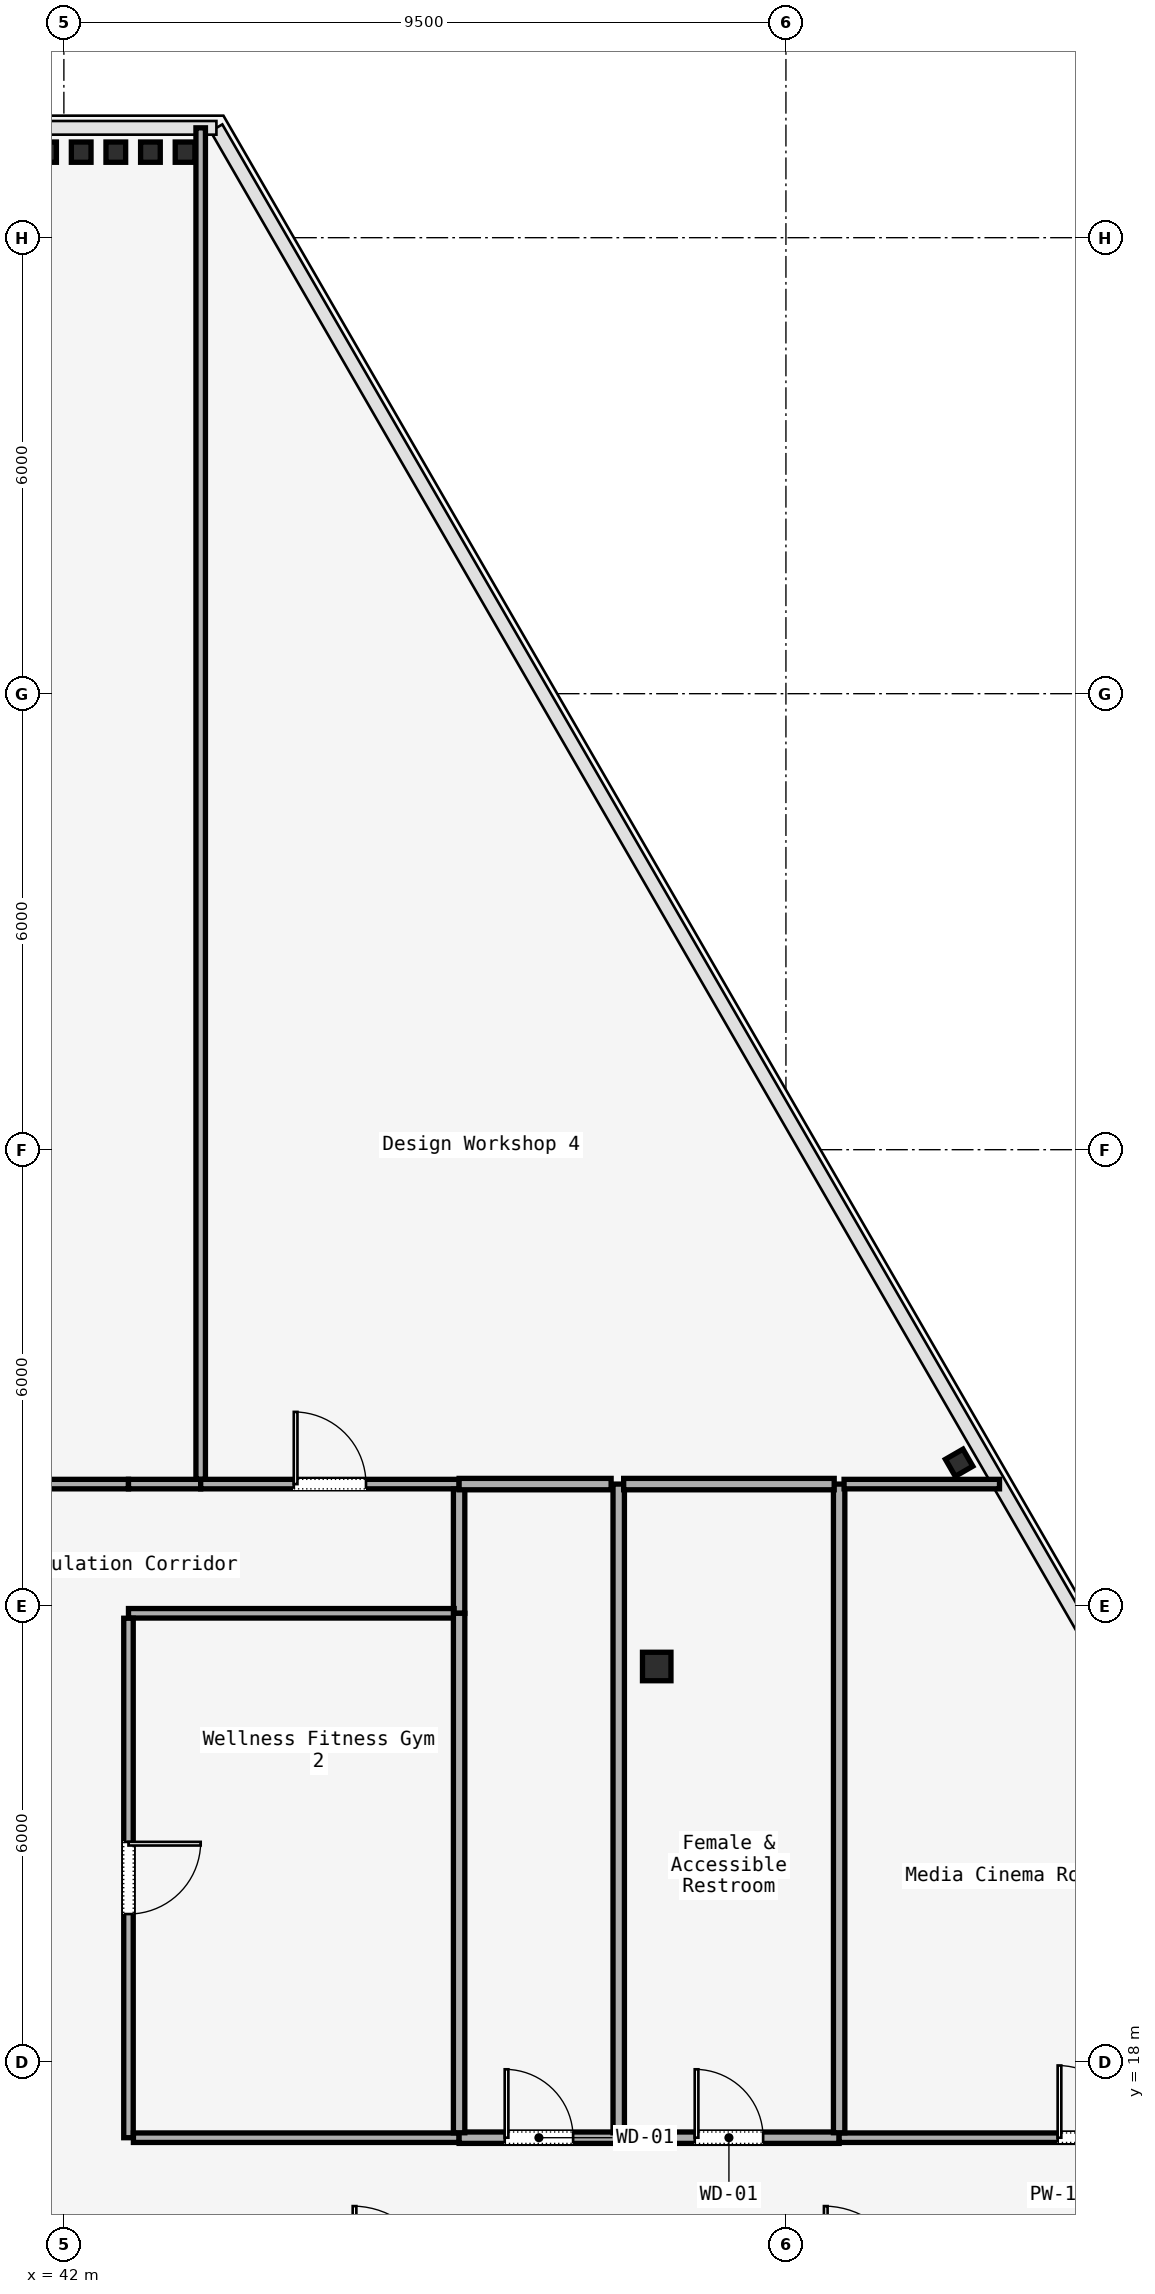
"""IFC4 building model, lengths in metres.
Left out: names, types, materials, properties, quantities, classifications, styles, units other than length and angle.
Written with IfcOpenShell. Run it as: python <this file> out.ifc"""

import sys

from ifc_helpers import new_model, si_unit, direction, frame, frame_2d, origin, origin_2d, place, context, subcontext, project, spatial, rectangle, i_section, extrude, element, fill, save


model = new_model("IFC4")
c1 = context("Model", 3, precision=1e-05, world=origin(), true_north=direction((0.0, 1.0)))
c2 = subcontext(c1, "Body", "Model", "MODEL_VIEW")
j1 = project(units=[si_unit("LENGTHUNIT", "METRE"), si_unit("PLANEANGLEUNIT", "RADIAN")], contexts=[c1])
p1 = place(None, origin())
s1 = spatial("IfcSite", under=j1, at=p1, CompositionType="ELEMENT")
p2 = place(p1, origin())
s2 = spatial("IfcBuilding", under=s1, at=p2, CompositionType="ELEMENT")
p3 = place(p2, frame((0.0, 0.0, 294.7)))
s3 = spatial("IfcBuildingStorey", under=s2, at=p3, CompositionType="ELEMENT", Elevation=294.7)
p4 = place(p3, frame((49.8, 23.2, 0.0), z_axis=(0.0, 0.0, 1.0), x_axis=(1.0, 0.0, 0.0)))
e1 = element("IfcColumn", 1, at=p4, inside=s3, PredefinedType="COLUMN", context=c2, shape_type="SweptSolid", body=[
    extrude(i_section(OverallWidth=0.375, OverallDepth=0.375, WebThickness=0.017, FlangeThickness=0.027, FilletRadius=0.015, at=origin_2d()), origin(), (0.0, 0.0, 1.0), 3.52),
])
p5 = place(p3, frame((53.778, 25.881, 0.0), z_axis=(-0.022172660725, -0.03838641888, 0.999016944782), x_axis=(-0.000225551712, 0.999262773798, 0.038390858658)))
e2 = element("IfcColumn", 2, at=p5, inside=s3, PredefinedType="COLUMN", context=c2, shape_type="SweptSolid", body=[
    extrude(i_section(OverallWidth=0.259, OverallDepth=0.267, WebThickness=0.013, FlangeThickness=0.021, FilletRadius=0.013, at=origin_2d()), origin(), (0.0, 0.0, 1.0), 3.523),
])
p6 = place(p3, frame((43.594, 43.125, 0.0), z_axis=(-0.021552704065, -0.034096239229, 0.999186132519), x_axis=(0.845284715511, -0.534316151471, 0.0)))
e3 = element("IfcColumn", 3, at=p6, inside=s3, PredefinedType="COLUMN", context=c2, shape_type="SweptSolid", body=[
    extrude(i_section(OverallWidth=0.259, OverallDepth=0.267, WebThickness=0.013, FlangeThickness=0.021, FilletRadius=0.013, at=origin_2d()), origin(), (0.0, 0.0, 1.0), 3.523),
])
p7 = place(p3, frame((43.139, 43.125, 0.0), z_axis=(-0.015455933932, -0.03410008742, 0.999298903304), x_axis=(0.910809744164, -0.412826367782, 0.0)))
e4 = element("IfcColumn", 4, at=p7, inside=s3, PredefinedType="COLUMN", context=c2, shape_type="SweptSolid", body=[
    extrude(i_section(OverallWidth=0.259, OverallDepth=0.267, WebThickness=0.013, FlangeThickness=0.021, FilletRadius=0.013, at=origin_2d()), origin(), (0.0, 0.0, 1.0), 3.522),
])
p8 = place(p3, frame((42.683, 43.125, 0.0), z_axis=(-0.009288131033, -0.034102690061, 0.999375173372), x_axis=(0.964854275814, -0.262785514144, 0.0)))
e5 = element("IfcColumn", 5, at=p8, inside=s3, PredefinedType="COLUMN", context=c2, shape_type="SweptSolid", body=[
    extrude(i_section(OverallWidth=0.259, OverallDepth=0.267, WebThickness=0.013, FlangeThickness=0.021, FilletRadius=0.013, at=origin_2d()), origin(), (0.0, 0.0, 1.0), 3.522),
])
for number, where, z_axis, x_axis in (
    (6, (42.228, 43.125, 0.0), (-0.003, -0.034, 0.999), (0.996, -0.091, 0.0)),
    (7, (41.772, 43.125, 0.0), (0.003, -0.034, 0.999), (0.996, 0.091, 0.0)),
):
    element("IfcColumn", number, at=place(p3, frame(where, z_axis=z_axis, x_axis=x_axis)), inside=s3, PredefinedType="COLUMN", context=c2, shape_type="SweptSolid", body=[
        extrude(i_section(OverallWidth=0.259, OverallDepth=0.267, WebThickness=0.013, FlangeThickness=0.021, FilletRadius=0.013, at=origin_2d()), origin(), (0.0, 0.0, 1.0), 3.522),
    ])
p9 = place(p3, frame((41.15, 25.6, 0.0), z_axis=(0.0, 0.0, 1.0), x_axis=(1.0, 0.0, 0.0)))
e8 = element("IfcWall", 8, at=p9, inside=s3, PredefinedType="PARTITIONING", context=c2, shape_type="SweptSolid", body=[
    extrude(rectangle(XDim=1.7, YDim=0.125, at=frame_2d((0.85, 0.0))), origin(), (0.0, 0.0, 1.0), 2.95),
])
p10 = place(p3, frame((42.85, 25.6, 0.0), z_axis=(0.0, 0.0, 1.0), x_axis=(1.0, 0.0, 0.0)))
e9 = element("IfcWall", 9, at=p10, inside=s3, PredefinedType="PARTITIONING", context=c2, shape_type="SweptSolid", body=[
    extrude(rectangle(XDim=0.95, YDim=0.125, at=frame_2d((0.475, 0.0))), origin(), (0.0, 0.0, 1.0), 2.95),
])
p11 = place(p3, frame((43.8, 25.6, 0.0), z_axis=(0.0, 0.0, 1.0), x_axis=(1.0, 0.0, 0.0)))
e10 = element("IfcWall", 10, at=p11, inside=s3, PredefinedType="PARTITIONING", context=c2, shape_type="SweptSolid", body=[
    extrude(rectangle(XDim=3.4, YDim=0.125, at=frame_2d((1.7, 0.0))), origin(), (0.0, 0.0, 1.0), 2.95),
])
p12 = place(p11, frame((1.225, 0.0, 0.0)))
e11 = element("IfcOpeningElement", 11, at=p12, cuts=e10, PredefinedType="OPENING", context=c2, shape_type="SweptSolid", body=[
    extrude(rectangle(XDim=0.95, YDim=2.2, at=frame_2d((0.475, 1.1))), frame((0.0, 0.062, 0.0), z_axis=(0.0, -1.0, 0.0), x_axis=(1.0, 0.0, 0.0)), (0.0, 0.0, 1.0), 0.125),
])
p13 = place(p3, frame((47.2, 25.535, 0.0), z_axis=(0.0, 0.0, 1.0), x_axis=(0.0, -1.0, 0.0)))
e12 = element("IfcWall", 12, at=p13, inside=s3, PredefinedType="PARTITIONING", context=c2, shape_type="SweptSolid", body=[
    extrude(rectangle(XDim=1.635, YDim=0.15, at=frame_2d((0.817, 0.0))), origin(), (0.0, 0.0, 1.0), 2.95),
])
p14 = place(p3, frame((47.135, 23.9, 0.0), z_axis=(0.0, 0.0, 1.0), x_axis=(-1.0, 0.0, 0.0)))
e13 = element("IfcWall", 13, at=p14, inside=s3, PredefinedType="PARTITIONING", context=c2, shape_type="SweptSolid", body=[
    extrude(rectangle(XDim=4.285, YDim=0.125, at=frame_2d((2.143, 0.0))), origin(), (0.0, 0.0, 1.0), 2.95),
])
p15 = place(p3, frame((42.85, 23.835, 0.0), z_axis=(0.0, 0.0, 1.0), x_axis=(0.0, -1.0, 0.0)))
e14 = element("IfcWall", 14, at=p15, inside=s3, PredefinedType="PARTITIONING", context=c2, shape_type="SweptSolid", body=[
    extrude(rectangle(XDim=6.835, YDim=0.125, at=frame_2d((3.417, 0.0))), origin(), (0.0, 0.0, 1.0), 2.95),
])
p16 = place(p15, frame((2.942, 0.0, 0.0)))
e15 = element("IfcOpeningElement", 15, at=p16, cuts=e14, PredefinedType="OPENING", context=c2, shape_type="SweptSolid", body=[
    extrude(rectangle(XDim=0.95, YDim=2.2, at=frame_2d((0.475, 1.1))), frame((0.0, 0.062, 0.0), z_axis=(0.0, -1.0, 0.0), x_axis=(1.0, 0.0, 0.0)), (0.0, 0.0, 1.0), 0.125),
])
p17 = place(p3, frame((42.915, 17.0, 0.0), z_axis=(0.0, 0.0, 1.0), x_axis=(1.0, 0.0, 0.0)))
e16 = element("IfcWall", 16, at=p17, inside=s3, PredefinedType="PARTITIONING", context=c2, shape_type="SweptSolid", body=[
    extrude(rectangle(XDim=4.285, YDim=0.125, at=frame_2d((2.143, 0.0))), origin(), (0.0, 0.0, 1.0), 2.95),
])
p18 = place(p3, frame((47.2, 17.0, 0.0), z_axis=(0.0, 0.0, 1.0), x_axis=(1.0, 0.0, 0.0)))
e17 = element("IfcWall", 17, at=p18, inside=s3, PredefinedType="PARTITIONING", context=c2, shape_type="SweptSolid", body=[
    extrude(rectangle(XDim=2.1, YDim=0.15, at=frame_2d((1.05, 0.0))), origin(), (0.0, 0.0, 1.0), 2.95),
])
p19 = place(p18, frame((0.6, 0.0, 0.0)))
e18 = element("IfcOpeningElement", 18, at=p19, cuts=e17, PredefinedType="OPENING", context=c2, shape_type="SweptSolid", body=[
    extrude(rectangle(XDim=0.9, YDim=2.15, at=frame_2d((0.45, 1.075))), frame((0.0, 0.075, 0.0), z_axis=(0.0, -1.0, 0.0), x_axis=(1.0, 0.0, 0.0)), (0.0, 0.0, 1.0), 0.15),
])
p20 = place(p3, frame((49.3, 17.0, 0.0), z_axis=(0.0, 0.0, 1.0), x_axis=(1.0, 0.0, 0.0)))
e19 = element("IfcWall", 19, at=p20, inside=s3, PredefinedType="PARTITIONING", context=c2, shape_type="SweptSolid", body=[
    extrude(rectangle(XDim=2.9, YDim=0.15, at=frame_2d((1.45, 0.0))), origin(), (0.0, 0.0, 1.0), 2.95),
])
p21 = place(p20, frame((1.0, 0.0, 0.0)))
e20 = element("IfcOpeningElement", 20, at=p21, cuts=e19, PredefinedType="OPENING", context=c2, shape_type="SweptSolid", body=[
    extrude(rectangle(XDim=0.9, YDim=2.15, at=frame_2d((0.45, 1.075))), frame((0.0, 0.075, 0.0), z_axis=(0.0, -1.0, 0.0), x_axis=(1.0, 0.0, 0.0)), (0.0, 0.0, 1.0), 0.15),
])
p22 = place(p3, frame((52.2, 17.0, 0.0), z_axis=(0.0, 0.0, 1.0), x_axis=(1.0, 0.0, 0.0)))
e21 = element("IfcWall", 21, at=p22, inside=s3, PredefinedType="PARTITIONING", context=c2, shape_type="SweptSolid", body=[
    extrude(rectangle(XDim=6.7, YDim=0.125, at=frame_2d((3.35, 0.0))), origin(), (0.0, 0.0, 1.0), 2.95),
])
p23 = place(p22, frame((2.875, 0.0, 0.0)))
e22 = element("IfcOpeningElement", 22, at=p23, cuts=e21, PredefinedType="OPENING", context=c2, shape_type="SweptSolid", body=[
    extrude(rectangle(XDim=0.95, YDim=2.2, at=frame_2d((0.475, 1.1))), frame((0.0, 0.062, 0.0), z_axis=(0.0, -1.0, 0.0), x_axis=(1.0, 0.0, 0.0)), (0.0, 0.0, 1.0), 0.125),
])
p24 = place(p3, frame((47.2, 23.9, 0.0), z_axis=(0.0, 0.0, 1.0), x_axis=(0.0, -1.0, 0.0)))
e23 = element("IfcWall", 23, at=p24, inside=s3, PredefinedType="PARTITIONING", context=c2, shape_type="SweptSolid", body=[
    extrude(rectangle(XDim=6.835, YDim=0.15, at=frame_2d((3.417, 0.0))), origin(), (0.0, 0.0, 1.0), 2.95),
])
p25 = place(p3, frame((52.2, 17.065, 0.0), z_axis=(0.0, 0.0, 1.0), x_axis=(0.0, 1.0, 0.0)))
e24 = element("IfcWall", 24, at=p25, inside=s3, PredefinedType="PARTITIONING", context=c2, shape_type="SweptSolid", body=[
    extrude(rectangle(XDim=8.535, YDim=0.15, at=frame_2d((4.268, 0.0))), origin(), (0.0, 0.0, 1.0), 2.95),
])
p26 = place(p3, frame((52.265, 25.6, 0.0), z_axis=(0.0, 0.0, 1.0), x_axis=(1.0, 0.0, 0.0)))
e25 = element("IfcWall", 25, at=p26, inside=s3, PredefinedType="PARTITIONING", context=c2, shape_type="SweptSolid", body=[
    extrude(rectangle(XDim=2.045, YDim=0.125, at=frame_2d((1.022, 0.0))), origin(), (0.0, 0.0, 1.0), 2.95),
])
p27 = place(p3, frame((47.2, 25.6, 0.0), z_axis=(0.0, 0.0, 1.0), x_axis=(1.0, 0.0, 0.0)))
e26 = element("IfcWall", 26, at=p27, inside=s3, PredefinedType="PARTITIONING", context=c2, shape_type="SweptSolid", body=[
    extrude(rectangle(XDim=2.0, YDim=0.15, at=frame_2d((1.0, 0.0))), origin(), (0.0, 0.0, 1.0), 2.95),
])
p28 = place(p3, frame((49.3, 25.6, 0.0), z_axis=(0.0, 0.0, 1.0), x_axis=(0.0, -1.0, 0.0)))
e27 = element("IfcWall", 27, at=p28, inside=s3, PredefinedType="PARTITIONING", context=c2, shape_type="SweptSolid", body=[
    extrude(rectangle(XDim=8.535, YDim=0.15, at=frame_2d((4.268, 0.0))), origin(), (0.0, 0.0, 1.0), 2.95),
])
p29 = place(p3, frame((49.365, 25.6, 0.0), z_axis=(0.0, 0.0, 1.0), x_axis=(1.0, 0.0, 0.0)))
e28 = element("IfcWall", 28, at=p29, inside=s3, PredefinedType="PARTITIONING", context=c2, shape_type="SweptSolid", body=[
    extrude(rectangle(XDim=2.77, YDim=0.15, at=frame_2d((1.385, 0.0))), origin(), (0.0, 0.0, 1.0), 2.95),
])
p30 = place(p3, frame((43.8, 25.665, 0.0), z_axis=(0.0, 0.0, 1.0), x_axis=(0.0, 1.0, 0.0)))
e29 = element("IfcWall", 29, at=p30, inside=s3, PredefinedType="PARTITIONING", context=c2, shape_type="SweptSolid", body=[
    extrude(rectangle(XDim=17.781, YDim=0.125, at=frame_2d((8.89, 0.0))), origin(), (0.0, 0.0, 1.0), 2.95),
])
p31 = place(p16, origin())
e30 = element("IfcDoor", 30, at=p31, inside=s3, OperationType="SINGLE_SWING_LEFT", PredefinedType="DOOR", context=c2, shape_type="SweptSolid", body=[
    extrude(rectangle(XDim=0.95, YDim=2.2, at=frame_2d((0.475, 1.1))), frame((0.0, 0.025, 0.0), z_axis=(0.0, -1.0, 0.0), x_axis=(1.0, 0.0, 0.0)), (0.0, 0.0, 1.0), 0.05),
])
fill(e15, e30)
p32 = place(p23, origin())
e31 = element("IfcDoor", 31, at=p32, inside=s3, OperationType="SINGLE_SWING_RIGHT", PredefinedType="DOOR", context=c2, shape_type="SweptSolid", body=[
    extrude(rectangle(XDim=0.95, YDim=2.2, at=frame_2d((0.475, 1.1))), frame((0.0, 0.025, 0.0), z_axis=(0.0, -1.0, 0.0), x_axis=(1.0, 0.0, 0.0)), (0.0, 0.0, 1.0), 0.05),
])
fill(e22, e31)
p33 = place(p19, origin())
e32 = element("IfcDoor", 32, at=p33, inside=s3, OperationType="SINGLE_SWING_LEFT", PredefinedType="DOOR", context=c2, shape_type="SweptSolid", body=[
    extrude(rectangle(XDim=0.9, YDim=2.15, at=frame_2d((0.45, 1.075))), frame((0.0, 0.025, 0.0), z_axis=(0.0, -1.0, 0.0), x_axis=(1.0, 0.0, 0.0)), (0.0, 0.0, 1.0), 0.05),
])
fill(e18, e32)
p34 = place(p21, origin())
e33 = element("IfcDoor", 33, at=p34, inside=s3, OperationType="SINGLE_SWING_RIGHT", PredefinedType="DOOR", context=c2, shape_type="SweptSolid", body=[
    extrude(rectangle(XDim=0.9, YDim=2.15, at=frame_2d((0.45, 1.075))), frame((0.0, 0.025, 0.0), z_axis=(0.0, -1.0, 0.0), x_axis=(1.0, 0.0, 0.0)), (0.0, 0.0, 1.0), 0.05),
])
fill(e20, e33)
p35 = place(p12, origin())
e34 = element("IfcDoor", 34, at=p35, inside=s3, OperationType="SINGLE_SWING_LEFT", PredefinedType="DOOR", context=c2, shape_type="SweptSolid", body=[
    extrude(rectangle(XDim=0.95, YDim=2.2, at=frame_2d((0.475, 1.1))), frame((0.0, 0.025, 0.0), z_axis=(0.0, -1.0, 0.0), x_axis=(1.0, 0.0, 0.0)), (0.0, 0.0, 1.0), 0.05),
])
fill(e11, e34)
save(model, sys.argv[1])
